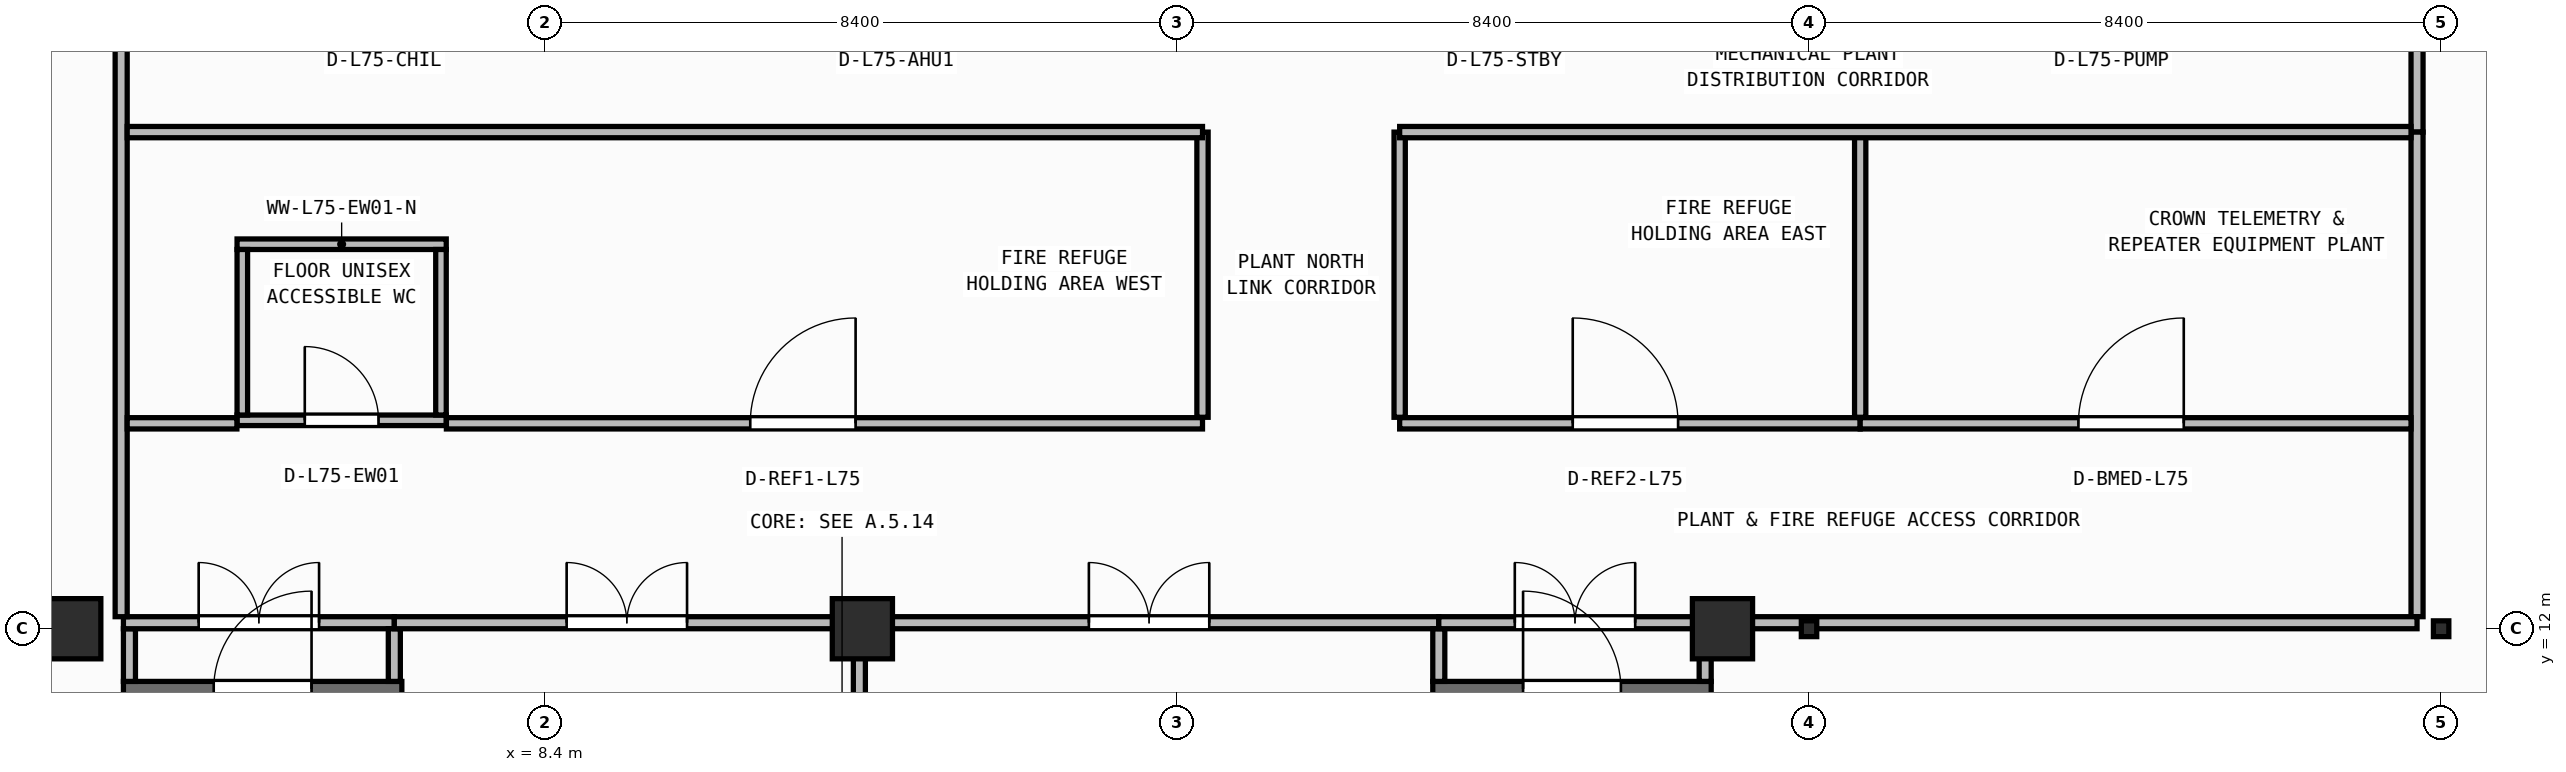
"""IFC4 building model, lengths in metres.
Left out: names, types, materials, properties, quantities, classifications, styles, units other than length and angle.
Written with IfcOpenShell. Run it as: python <this file> out.ifc"""

import sys

from ifc_helpers import new_model, si_unit, direction, frame, frame_2d, origin, origin_2d, place, context, subcontext, project, spatial, rectangle, i_section, extrude, element, fill, save


model = new_model("IFC4")
c1 = context("Model", 3, precision=1e-05, world=origin(), true_north=direction((0.0, 1.0)))
c2 = subcontext(c1, "Body", "Model", "MODEL_VIEW")
j1 = project(units=[si_unit("LENGTHUNIT", "METRE"), si_unit("PLANEANGLEUNIT", "RADIAN")], contexts=[c1])
p1 = place(None, origin())
s1 = spatial("IfcSite", under=j1, at=p1, CompositionType="ELEMENT")
p2 = place(p1, origin())
s2 = spatial("IfcBuilding", under=s1, at=p2, CompositionType="ELEMENT")
p3 = place(p2, frame((0.0, 0.0, 303.95)))
s3 = spatial("IfcBuildingStorey", under=s2, at=p3, CompositionType="ELEMENT", Elevation=303.95)
for number, where, z_axis, x_axis in (
    (1, (2.1, 12.0, 0.0), (0.0, 0.0, 1.0), (1.0, 0.0, 0.0)),
    (2, (12.62, 12.0, 0.0), (0.0, 0.0, 1.0), (1.0, 0.0, 0.0)),
    (3, (24.05, 12.0, 0.0), (0.0, 0.0, 1.0), (1.0, 0.0, 0.0)),
):
    element("IfcColumn", number, at=place(p3, frame(where, z_axis=z_axis, x_axis=x_axis)), inside=s3, PredefinedType="COLUMN", context=c2, shape_type="SweptSolid", body=[
        extrude(rectangle(XDim=0.8, YDim=0.8, at=origin_2d()), origin(), (0.0, 0.0, 1.0), 5.25),
    ])
for number, where, z_axis, x_axis in (
    (4, (25.2, 12.0, 0.0), (0.0, 0.0, 1.0), (1.0, 0.0, 0.0)),
    (5, (33.6, 12.0, 0.0), (0.0, 0.0, 1.0), (1.0, 0.0, 0.0)),
):
    element("IfcColumn", number, at=place(p3, frame(where, z_axis=z_axis, x_axis=x_axis)), inside=s3, PredefinedType="COLUMN", context=c2, shape_type="SweptSolid", body=[
        extrude(i_section(OverallWidth=0.205, OverallDepth=0.21, WebThickness=0.009, FlangeThickness=0.014, FilletRadius=0.011, at=origin_2d()), origin(), (0.0, 0.0, 1.0), 5.25),
    ])
p4 = place(p3, frame((2.8, 11.2, 0.0), z_axis=(0.0, 0.0, 1.0), x_axis=(1.0, 0.0, 0.0)))
e6 = element("IfcWall", 6, at=p4, inside=s3, PredefinedType="SHEAR", context=c2, shape_type="SweptSolid", body=[
    extrude(rectangle(XDim=3.7, YDim=0.2, at=frame_2d((1.85, 0.0))), origin(), (0.0, 0.0, 1.0), 4.99),
])
p5 = place(p4, frame((1.2, 0.0, 0.0)))
e7 = element("IfcOpeningElement", 7, at=p5, cuts=e6, PredefinedType="OPENING", context=c2, shape_type="SweptSolid", body=[
    extrude(rectangle(XDim=1.3, YDim=2.15, at=frame_2d((0.65, 1.075))), frame((0.0, 0.11, 0.0), z_axis=(0.0, -1.0, 0.0), x_axis=(1.0, 0.0, 0.0)), (0.0, 0.0, 1.0), 0.22),
])
p6 = place(p3, frame((20.2, 11.2, 0.0), z_axis=(0.0, 0.0, 1.0), x_axis=(1.0, 0.0, 0.0)))
e8 = element("IfcWall", 8, at=p6, inside=s3, PredefinedType="SHEAR", context=c2, shape_type="SweptSolid", body=[
    extrude(rectangle(XDim=3.7, YDim=0.2, at=frame_2d((1.85, 0.0))), origin(), (0.0, 0.0, 1.0), 4.99),
])
p7 = place(p6, frame((1.2, 0.0, 0.0)))
e9 = element("IfcOpeningElement", 9, at=p7, cuts=e8, PredefinedType="OPENING", context=c2, shape_type="SweptSolid", body=[
    extrude(rectangle(XDim=1.3, YDim=2.15, at=frame_2d((0.65, 1.075))), frame((0.0, 0.11, 0.0), z_axis=(0.0, -1.0, 0.0), x_axis=(1.0, 0.0, 0.0)), (0.0, 0.0, 1.0), 0.22),
])
p8 = place(p3, frame((2.88, 11.3, 0.0), z_axis=(0.0, 0.0, 1.0), x_axis=(0.0, 1.0, 0.0)))
e10 = element("IfcWall", 10, at=p8, inside=s3, PredefinedType="PARTITIONING", context=c2, shape_type="SweptSolid", body=[
    extrude(rectangle(XDim=0.7, YDim=0.16, at=frame_2d((0.35, 0.0))), origin(), (0.0, 0.0, 1.0), 4.99),
])
p9 = place(p3, frame((2.8, 12.08, 0.0), z_axis=(0.0, 0.0, 1.0), x_axis=(1.0, 0.0, 0.0)))
e11 = element("IfcWall", 11, at=p9, inside=s3, PredefinedType="PARTITIONING", context=c2, shape_type="SweptSolid", body=[
    extrude(rectangle(XDim=3.6, YDim=0.16, at=frame_2d((1.8, 0.0))), origin(), (0.0, 0.0, 1.0), 4.265),
])
p10 = place(p9, frame((1.0, 0.0, 0.0)))
e12 = element("IfcOpeningElement", 12, at=p10, cuts=e11, PredefinedType="OPENING", context=c2, shape_type="SweptSolid", body=[
    extrude(rectangle(XDim=1.6, YDim=2.05, at=frame_2d((0.8, 1.025))), frame((0.0, 0.09, 0.0), z_axis=(0.0, -1.0, 0.0), x_axis=(1.0, 0.0, 0.0)), (0.0, 0.0, 1.0), 0.18),
])
p11 = place(p3, frame((6.4, 11.3, 0.0), z_axis=(0.0, 0.0, 1.0), x_axis=(0.0, 1.0, 0.0)))
e13 = element("IfcWall", 13, at=p11, inside=s3, PredefinedType="PARTITIONING", context=c2, shape_type="SweptSolid", body=[
    extrude(rectangle(XDim=0.7, YDim=0.16, at=frame_2d((0.35, 0.0))), origin(), (0.0, 0.0, 1.0), 4.99),
])
p12 = place(p3, frame((6.4, 12.08, 0.0), z_axis=(0.0, 0.0, 1.0), x_axis=(1.0, 0.0, 0.0)))
e14 = element("IfcWall", 14, at=p12, inside=s3, PredefinedType="PARTITIONING", context=c2, shape_type="SweptSolid", body=[
    extrude(rectangle(XDim=6.18, YDim=0.16, at=frame_2d((3.09, 0.0))), origin(), (0.0, 0.0, 1.0), 4.265),
])
p13 = place(p12, frame((2.29, 0.0, 0.0)))
e15 = element("IfcOpeningElement", 15, at=p13, cuts=e14, PredefinedType="OPENING", context=c2, shape_type="SweptSolid", body=[
    extrude(rectangle(XDim=1.6, YDim=2.05, at=frame_2d((0.8, 1.025))), frame((0.0, 0.09, 0.0), z_axis=(0.0, -1.0, 0.0), x_axis=(1.0, 0.0, 0.0)), (0.0, 0.0, 1.0), 0.18),
])
p14 = place(p3, frame((12.58, 9.21, 0.0), z_axis=(0.0, 0.0, 1.0), x_axis=(0.0, 1.0, 0.0)))
e16 = element("IfcWall", 16, at=p14, inside=s3, PredefinedType="PARTITIONING", context=c2, shape_type="SweptSolid", body=[
    extrude(rectangle(XDim=2.79, YDim=0.16, at=frame_2d((1.395, 0.0))), origin(), (0.0, 0.0, 1.0), 4.437),
])
p15 = place(p3, frame((12.58, 12.08, 0.0), z_axis=(0.0, 0.0, 1.0), x_axis=(1.0, 0.0, 0.0)))
e17 = element("IfcWall", 17, at=p15, inside=s3, PredefinedType="PARTITIONING", context=c2, shape_type="SweptSolid", body=[
    extrude(rectangle(XDim=7.7, YDim=0.16, at=frame_2d((3.85, 0.0))), origin(), (0.0, 0.0, 1.0), 4.265),
])
p16 = place(p15, frame((3.05, 0.0, 0.0)))
e18 = element("IfcOpeningElement", 18, at=p16, cuts=e17, PredefinedType="OPENING", context=c2, shape_type="SweptSolid", body=[
    extrude(rectangle(XDim=1.6, YDim=2.05, at=frame_2d((0.8, 1.025))), frame((0.0, 0.09, 0.0), z_axis=(0.0, -1.0, 0.0), x_axis=(1.0, 0.0, 0.0)), (0.0, 0.0, 1.0), 0.18),
])
p17 = place(p3, frame((20.28, 11.3, 0.0), z_axis=(0.0, 0.0, 1.0), x_axis=(0.0, 1.0, 0.0)))
e19 = element("IfcWall", 19, at=p17, inside=s3, PredefinedType="PARTITIONING", context=c2, shape_type="SweptSolid", body=[
    extrude(rectangle(XDim=0.7, YDim=0.16, at=frame_2d((0.35, 0.0))), origin(), (0.0, 0.0, 1.0), 4.99),
])
p18 = place(p3, frame((20.28, 12.08, 0.0), z_axis=(0.0, 0.0, 1.0), x_axis=(1.0, 0.0, 0.0)))
e20 = element("IfcWall", 20, at=p18, inside=s3, PredefinedType="PARTITIONING", context=c2, shape_type="SweptSolid", body=[
    extrude(rectangle(XDim=3.62, YDim=0.16, at=frame_2d((1.81, 0.0))), origin(), (0.0, 0.0, 1.0), 4.265),
])
p19 = place(p18, frame((1.01, 0.0, 0.0)))
e21 = element("IfcOpeningElement", 21, at=p19, cuts=e20, PredefinedType="OPENING", context=c2, shape_type="SweptSolid", body=[
    extrude(rectangle(XDim=1.6, YDim=2.05, at=frame_2d((0.8, 1.025))), frame((0.0, 0.09, 0.0), z_axis=(0.0, -1.0, 0.0), x_axis=(1.0, 0.0, 0.0)), (0.0, 0.0, 1.0), 0.18),
])
p20 = place(p3, frame((23.82, 11.3, 0.0), z_axis=(0.0, 0.0, 1.0), x_axis=(0.0, 1.0, 0.0)))
e22 = element("IfcWall", 22, at=p20, inside=s3, PredefinedType="PARTITIONING", context=c2, shape_type="SweptSolid", body=[
    extrude(rectangle(XDim=0.7, YDim=0.16, at=frame_2d((0.35, 0.0))), origin(), (0.0, 0.0, 1.0), 4.99),
])
p21 = place(p3, frame((4.31, 14.77, 0.0), z_axis=(0.0, 0.0, 1.0), x_axis=(1.0, 0.0, 0.0)))
e23 = element("IfcWall", 23, at=p21, inside=s3, PredefinedType="PARTITIONING", context=c2, shape_type="SweptSolid", body=[
    extrude(rectangle(XDim=2.78, YDim=0.14, at=frame_2d((1.39, 0.0))), origin(), (0.0, 0.0, 1.0), 4.99),
])
p22 = place(p21, frame((0.9, 0.0, 0.0)))
e24 = element("IfcOpeningElement", 24, at=p22, cuts=e23, PredefinedType="OPENING", context=c2, shape_type="SweptSolid", body=[
    extrude(rectangle(XDim=0.98, YDim=2.1, at=frame_2d((0.49, 1.05))), frame((0.0, 0.08, 0.0), z_axis=(0.0, -1.0, 0.0), x_axis=(1.0, 0.0, 0.0)), (0.0, 0.0, 1.0), 0.16),
])
p23 = place(p3, frame((4.31, 17.11, 0.0), z_axis=(0.0, 0.0, 1.0), x_axis=(1.0, 0.0, 0.0)))
e25 = element("IfcWall", 25, at=p23, inside=s3, PredefinedType="PARTITIONING", context=c2, shape_type="SweptSolid", body=[
    extrude(rectangle(XDim=2.78, YDim=0.14, at=frame_2d((1.39, 0.0))), origin(), (0.0, 0.0, 1.0), 4.99),
])
for number, where, z_axis, x_axis in (
    (26, (4.38, 14.84, 0.0), (0.0, 0.0, 1.0), (0.0, 1.0, 0.0)),
    (27, (7.02, 14.84, 0.0), (0.0, 0.0, 1.0), (0.0, 1.0, 0.0)),
):
    element("IfcWall", number, at=place(p3, frame(where, z_axis=z_axis, x_axis=x_axis)), inside=s3, PredefinedType="PARTITIONING", context=c2, shape_type="SweptSolid", body=[
        extrude(rectangle(XDim=2.2, YDim=0.14, at=frame_2d((1.1, 0.0))), origin(), (0.0, 0.0, 1.0), 4.99),
    ])
p24 = place(p3, frame((2.77, 12.16, 0.0), z_axis=(0.0, 0.0, 1.0), x_axis=(0.0, 1.0, 0.0)))
e28 = element("IfcWall", 28, at=p24, inside=s3, PredefinedType="PARTITIONING", context=c2, shape_type="SweptSolid", body=[
    extrude(rectangle(XDim=16.04, YDim=0.16, at=frame_2d((8.02, 0.0))), origin(), (0.0, 0.0, 1.0), 4.99),
])
p25 = place(p3, frame((33.28, 18.6, 0.0), z_axis=(0.0, 0.0, 1.0), x_axis=(0.0, 1.0, 0.0)))
e29 = element("IfcWall", 29, at=p25, inside=s3, PredefinedType="PARTITIONING", context=c2, shape_type="SweptSolid", body=[
    extrude(rectangle(XDim=9.6, YDim=0.16, at=frame_2d((4.8, 0.0))), origin(), (0.0, 0.0, 1.0), 4.437),
])
p26 = place(p3, frame((33.28, 12.16, 0.0), z_axis=(0.0, 0.0, 1.0), x_axis=(0.0, 1.0, 0.0)))
e30 = element("IfcWall", 30, at=p26, inside=s3, PredefinedType="PARTITIONING", context=c2, shape_type="SweptSolid", body=[
    extrude(rectangle(XDim=6.44, YDim=0.16, at=frame_2d((3.22, 0.0))), origin(), (0.0, 0.0, 1.0), 4.437),
])
p27 = place(p3, frame((23.92, 12.08, 0.0), z_axis=(0.0, 0.0, 1.0), x_axis=(1.0, 0.0, 0.0)))
e31 = element("IfcWall", 31, at=p27, inside=s3, PredefinedType="PARTITIONING", context=c2, shape_type="SweptSolid", body=[
    extrude(rectangle(XDim=9.36, YDim=0.16, at=frame_2d((4.68, 0.0))), origin(), (0.0, 0.0, 1.0), 4.265),
])
p28 = place(p3, frame((2.85, 14.73, 0.0), z_axis=(0.0, 0.0, 1.0), x_axis=(1.0, 0.0, 0.0)))
e32 = element("IfcWall", 32, at=p28, inside=s3, PredefinedType="PARTITIONING", context=c2, shape_type="SweptSolid", body=[
    extrude(rectangle(XDim=1.458, YDim=0.15, at=frame_2d((0.729, 0.0))), origin(), (0.0, 0.0, 1.0), 4.99),
])
p29 = place(p3, frame((7.092, 14.73, 0.0), z_axis=(0.0, 0.0, 1.0), x_axis=(1.0, 0.0, 0.0)))
e33 = element("IfcWall", 33, at=p29, inside=s3, PredefinedType="PARTITIONING", context=c2, shape_type="SweptSolid", body=[
    extrude(rectangle(XDim=10.048, YDim=0.15, at=frame_2d((5.024, 0.0))), origin(), (0.0, 0.0, 1.0), 4.99),
])
p30 = place(p29, frame((4.038, 0.0, 0.0)))
e34 = element("IfcOpeningElement", 34, at=p30, cuts=e33, PredefinedType="OPENING", context=c2, shape_type="SweptSolid", body=[
    extrude(rectangle(XDim=1.4, YDim=2.15, at=frame_2d((0.7, 1.075))), frame((0.0, 0.085, 0.0), z_axis=(0.0, -1.0, 0.0), x_axis=(1.0, 0.0, 0.0)), (0.0, 0.0, 1.0), 0.17),
])
p31 = place(p3, frame((17.14, 14.81, 0.0), z_axis=(0.0, 0.0, 1.0), x_axis=(0.0, 1.0, 0.0)))
e35 = element("IfcWall", 35, at=p31, inside=s3, PredefinedType="PARTITIONING", context=c2, shape_type="SweptSolid", body=[
    extrude(rectangle(XDim=3.79, YDim=0.15, at=frame_2d((1.895, 0.0))), origin(), (0.0, 0.0, 1.0), 4.99),
])
p32 = place(p3, frame((2.85, 18.6, 0.0), z_axis=(0.0, 0.0, 1.0), x_axis=(1.0, 0.0, 0.0)))
e36 = element("IfcWall", 36, at=p32, inside=s3, PredefinedType="PARTITIONING", context=c2, shape_type="SweptSolid", body=[
    extrude(rectangle(XDim=14.29, YDim=0.15, at=frame_2d((7.145, 0.0))), origin(), (0.0, 0.0, 1.0), 4.99),
])
p33 = place(p3, frame((19.76, 14.81, 0.0), z_axis=(0.0, 0.0, 1.0), x_axis=(0.0, 1.0, 0.0)))
e37 = element("IfcWall", 37, at=p33, inside=s3, PredefinedType="PARTITIONING", context=c2, shape_type="SweptSolid", body=[
    extrude(rectangle(XDim=3.79, YDim=0.15, at=frame_2d((1.895, 0.0))), origin(), (0.0, 0.0, 1.0), 4.99),
])
p34 = place(p3, frame((19.76, 14.73, 0.0), z_axis=(0.0, 0.0, 1.0), x_axis=(1.0, 0.0, 0.0)))
e38 = element("IfcWall", 38, at=p34, inside=s3, PredefinedType="PARTITIONING", context=c2, shape_type="SweptSolid", body=[
    extrude(rectangle(XDim=6.12, YDim=0.15, at=frame_2d((3.06, 0.0))), origin(), (0.0, 0.0, 1.0), 4.99),
])
p35 = place(p34, frame((2.3, 0.0, 0.0)))
e39 = element("IfcOpeningElement", 39, at=p35, cuts=e38, PredefinedType="OPENING", context=c2, shape_type="SweptSolid", body=[
    extrude(rectangle(XDim=1.4, YDim=2.15, at=frame_2d((0.7, 1.075))), frame((0.0, 0.085, 0.0), z_axis=(0.0, -1.0, 0.0), x_axis=(1.0, 0.0, 0.0)), (0.0, 0.0, 1.0), 0.17),
])
p36 = place(p3, frame((25.88, 14.81, 0.0), z_axis=(0.0, 0.0, 1.0), x_axis=(0.0, 1.0, 0.0)))
e40 = element("IfcWall", 40, at=p36, inside=s3, PredefinedType="PARTITIONING", context=c2, shape_type="SweptSolid", body=[
    extrude(rectangle(XDim=3.79, YDim=0.15, at=frame_2d((1.895, 0.0))), origin(), (0.0, 0.0, 1.0), 4.99),
])
p37 = place(p3, frame((25.88, 14.73, 0.0), z_axis=(0.0, 0.0, 1.0), x_axis=(1.0, 0.0, 0.0)))
e41 = element("IfcWall", 41, at=p37, inside=s3, PredefinedType="PARTITIONING", context=c2, shape_type="SweptSolid", body=[
    extrude(rectangle(XDim=7.32, YDim=0.15, at=frame_2d((3.66, 0.0))), origin(), (0.0, 0.0, 1.0), 4.99),
])
p38 = place(p37, frame((2.9, 0.0, 0.0)))
e42 = element("IfcOpeningElement", 42, at=p38, cuts=e41, PredefinedType="OPENING", context=c2, shape_type="SweptSolid", body=[
    extrude(rectangle(XDim=1.4, YDim=2.15, at=frame_2d((0.7, 1.075))), frame((0.0, 0.085, 0.0), z_axis=(0.0, -1.0, 0.0), x_axis=(1.0, 0.0, 0.0)), (0.0, 0.0, 1.0), 0.17),
])
p39 = place(p3, frame((19.76, 18.6, 0.0), z_axis=(0.0, 0.0, 1.0), x_axis=(1.0, 0.0, 0.0)))
e43 = element("IfcWall", 43, at=p39, inside=s3, PredefinedType="PARTITIONING", context=c2, shape_type="SweptSolid", body=[
    extrude(rectangle(XDim=13.44, YDim=0.15, at=frame_2d((6.72, 0.0))), origin(), (0.0, 0.0, 1.0), 4.99),
])
p40 = place(p5, origin())
e44 = element("IfcDoor", 44, at=p40, inside=s3, OperationType="SINGLE_SWING_RIGHT", PredefinedType="DOOR", context=c2, shape_type="SweptSolid", body=[
    extrude(rectangle(XDim=1.3, YDim=2.15, at=frame_2d((0.65, 1.075))), frame((0.0, 0.025, 0.0), z_axis=(0.0, -1.0, 0.0), x_axis=(1.0, 0.0, 0.0)), (0.0, 0.0, 1.0), 0.05),
])
fill(e7, e44)
p41 = place(p7, origin())
e45 = element("IfcDoor", 45, at=p41, inside=s3, OperationType="SINGLE_SWING_LEFT", PredefinedType="DOOR", context=c2, shape_type="SweptSolid", body=[
    extrude(rectangle(XDim=1.3, YDim=2.15, at=frame_2d((0.65, 1.075))), frame((0.0, 0.025, 0.0), z_axis=(0.0, -1.0, 0.0), x_axis=(1.0, 0.0, 0.0)), (0.0, 0.0, 1.0), 0.05),
])
fill(e9, e45)
p42 = place(p10, origin())
e46 = element("IfcDoor", 46, at=p42, inside=s3, OperationType="DOUBLE_DOOR_SINGLE_SWING", PredefinedType="DOOR", context=c2, shape_type="SweptSolid", body=[
    extrude(rectangle(XDim=1.6, YDim=2.05, at=frame_2d((0.8, 1.025))), frame((0.0, 0.025, 0.0), z_axis=(0.0, -1.0, 0.0), x_axis=(1.0, 0.0, 0.0)), (0.0, 0.0, 1.0), 0.05),
])
fill(e12, e46)
p43 = place(p13, origin())
e47 = element("IfcDoor", 47, at=p43, inside=s3, OperationType="DOUBLE_DOOR_SINGLE_SWING", PredefinedType="DOOR", context=c2, shape_type="SweptSolid", body=[
    extrude(rectangle(XDim=1.6, YDim=2.05, at=frame_2d((0.8, 1.025))), frame((0.0, 0.025, 0.0), z_axis=(0.0, -1.0, 0.0), x_axis=(1.0, 0.0, 0.0)), (0.0, 0.0, 1.0), 0.05),
])
fill(e15, e47)
p44 = place(p16, origin())
e48 = element("IfcDoor", 48, at=p44, inside=s3, OperationType="DOUBLE_DOOR_SINGLE_SWING", PredefinedType="DOOR", context=c2, shape_type="SweptSolid", body=[
    extrude(rectangle(XDim=1.6, YDim=2.05, at=frame_2d((0.8, 1.025))), frame((0.0, 0.025, 0.0), z_axis=(0.0, -1.0, 0.0), x_axis=(1.0, 0.0, 0.0)), (0.0, 0.0, 1.0), 0.05),
])
fill(e18, e48)
p45 = place(p19, origin())
e49 = element("IfcDoor", 49, at=p45, inside=s3, OperationType="DOUBLE_DOOR_SINGLE_SWING", PredefinedType="DOOR", context=c2, shape_type="SweptSolid", body=[
    extrude(rectangle(XDim=1.6, YDim=2.05, at=frame_2d((0.8, 1.025))), frame((0.0, 0.025, 0.0), z_axis=(0.0, -1.0, 0.0), x_axis=(1.0, 0.0, 0.0)), (0.0, 0.0, 1.0), 0.05),
])
fill(e21, e49)
p46 = place(p22, origin())
e50 = element("IfcDoor", 50, at=p46, inside=s3, OperationType="SINGLE_SWING_LEFT", PredefinedType="DOOR", context=c2, shape_type="SweptSolid", body=[
    extrude(rectangle(XDim=0.98, YDim=2.1, at=frame_2d((0.49, 1.05))), frame((0.0, 0.025, 0.0), z_axis=(0.0, -1.0, 0.0), x_axis=(1.0, 0.0, 0.0)), (0.0, 0.0, 1.0), 0.05),
])
fill(e24, e50)
p47 = place(p30, origin())
e51 = element("IfcDoor", 51, at=p47, inside=s3, OperationType="SINGLE_SWING_RIGHT", PredefinedType="DOOR", context=c2, shape_type="SweptSolid", body=[
    extrude(rectangle(XDim=1.4, YDim=2.15, at=frame_2d((0.7, 1.075))), frame((0.0, 0.025, 0.0), z_axis=(0.0, -1.0, 0.0), x_axis=(1.0, 0.0, 0.0)), (0.0, 0.0, 1.0), 0.05),
])
fill(e34, e51)
p48 = place(p35, origin())
e52 = element("IfcDoor", 52, at=p48, inside=s3, OperationType="SINGLE_SWING_LEFT", PredefinedType="DOOR", context=c2, shape_type="SweptSolid", body=[
    extrude(rectangle(XDim=1.4, YDim=2.15, at=frame_2d((0.7, 1.075))), frame((0.0, 0.025, 0.0), z_axis=(0.0, -1.0, 0.0), x_axis=(1.0, 0.0, 0.0)), (0.0, 0.0, 1.0), 0.05),
])
fill(e39, e52)
p49 = place(p38, origin())
e53 = element("IfcDoor", 53, at=p49, inside=s3, OperationType="SINGLE_SWING_RIGHT", PredefinedType="DOOR", context=c2, shape_type="SweptSolid", body=[
    extrude(rectangle(XDim=1.4, YDim=2.15, at=frame_2d((0.7, 1.075))), frame((0.0, 0.025, 0.0), z_axis=(0.0, -1.0, 0.0), x_axis=(1.0, 0.0, 0.0)), (0.0, 0.0, 1.0), 0.05),
])
fill(e42, e53)
save(model, sys.argv[1])
